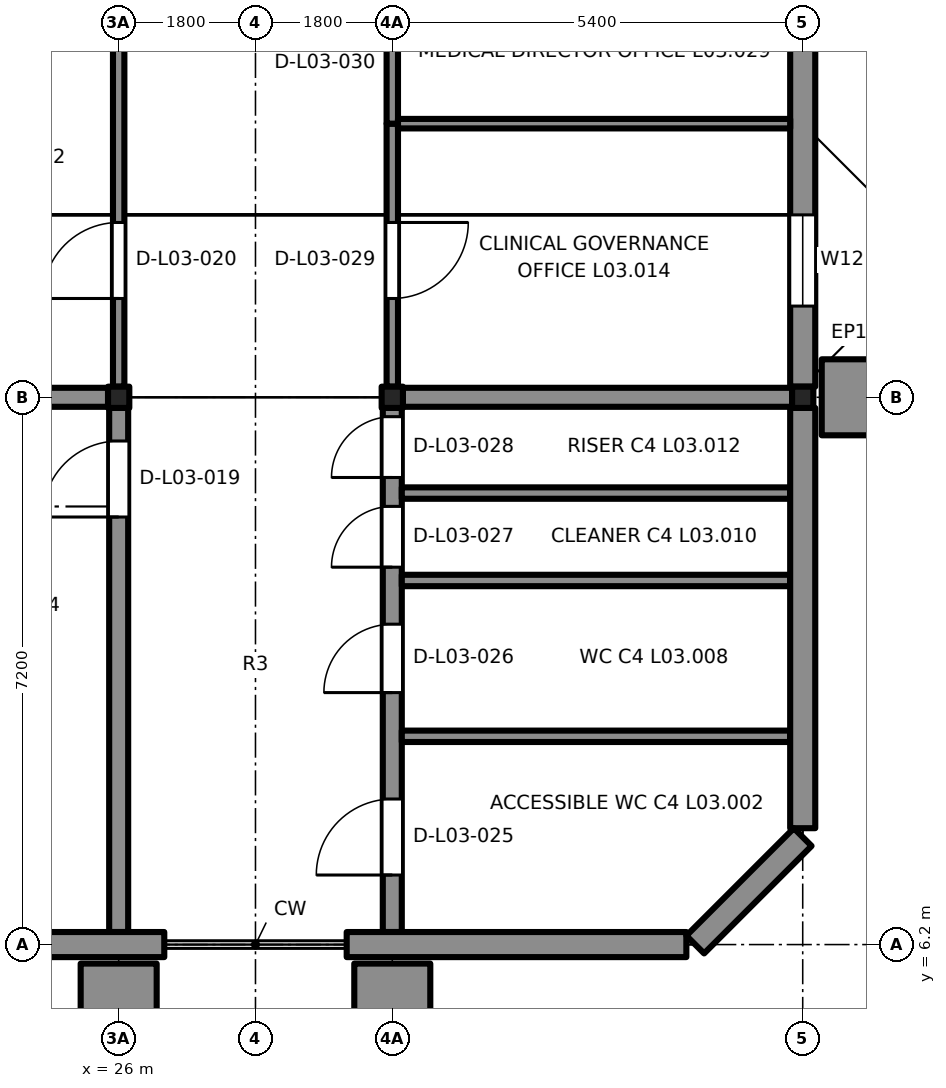
"""IFC4 building model, lengths in metres.
Left out: names, types, materials, properties, quantities, classifications, styles, units other than length and angle.
Written with IfcOpenShell. Run it as: python <this file> out.ifc"""

import sys

from ifc_helpers import new_model, si_unit, direction, frame, frame_2d, origin, origin_2d, place, context, subcontext, project, spatial, rectangle, extrude, element, fill, save


model = new_model("IFC4")
c1 = context("Model", 3, precision=1e-05, world=origin(), true_north=direction((0.0, 1.0)))
c2 = subcontext(c1, "Body", "Model", "MODEL_VIEW")
j1 = project(units=[si_unit("LENGTHUNIT", "METRE"), si_unit("PLANEANGLEUNIT", "RADIAN")], contexts=[c1])
p1 = place(None, origin())
s1 = spatial("IfcSite", under=j1, at=p1, CompositionType="ELEMENT")
p2 = place(p1, origin())
s2 = spatial("IfcBuilding", under=s1, at=p2, CompositionType="ELEMENT")
p3 = place(p2, frame((0.0, 0.0, 14.1)))
s3 = spatial("IfcBuildingStorey", under=s2, at=p3, CompositionType="ELEMENT", Elevation=14.1)
for number, where, z_axis, x_axis in (
    (1, (26.0, 13.4, 0.0), (0.0, 0.0, 1.0), (1.0, 0.0, 0.0)),
    (2, (29.6, 13.4, 0.0), (0.0, 0.0, 1.0), (1.0, 0.0, 0.0)),
    (3, (35.0, 13.4, 0.0), (0.0, 0.0, 1.0), (1.0, 0.0, 0.0)),
):
    element("IfcColumn", number, at=place(p3, frame(where, z_axis=z_axis, x_axis=x_axis)), inside=s3, PredefinedType="COLUMN", context=c2, shape_type="SweptSolid", body=[
        extrude(rectangle(XDim=0.28, YDim=0.28, at=origin_2d()), origin(), (0.0, 0.0, 1.0), 3.9),
    ])
p4 = place(p3, frame((26.0, 6.365, 0.0), z_axis=(0.0, 0.0, 1.0), x_axis=(0.0, 1.0, 0.0)))
e4 = element("IfcWall", 4, at=p4, inside=s3, PredefinedType="SHEAR", context=c2, shape_type="SweptSolid", body=[
    extrude(rectangle(XDim=6.895, YDim=0.25, at=frame_2d((3.448, 0.0))), origin(), (0.0, 0.0, 1.0), 3.2),
])
p5 = place(p4, frame((5.46, 0.0, 0.0)))
e5 = element("IfcOpeningElement", 5, at=p5, cuts=e4, PredefinedType="OPENING", context=c2, shape_type="SweptSolid", body=[
    extrude(rectangle(XDim=1.0, YDim=2.1, at=frame_2d((0.5, 1.05))), frame((0.0, 0.135, 0.0), z_axis=(0.0, -1.0, 0.0), x_axis=(1.0, 0.0, 0.0)), (0.0, 0.0, 1.0), 0.27),
])
p6 = place(p3, frame((20.74, 13.4, 0.0), z_axis=(0.0, 0.0, 1.0), x_axis=(1.0, 0.0, 0.0)))
e6 = element("IfcWall", 6, at=p6, inside=s3, PredefinedType="SHEAR", context=c2, shape_type="SweptSolid", body=[
    extrude(rectangle(XDim=5.12, YDim=0.25, at=frame_2d((2.56, 0.0))), origin(), (0.0, 0.0, 1.0), 3.2),
])
p7 = place(p3, frame((29.6, 6.365, 0.0), z_axis=(0.0, 0.0, 1.0), x_axis=(0.0, 1.0, 0.0)))
e7 = element("IfcWall", 7, at=p7, inside=s3, PredefinedType="SHEAR", context=c2, shape_type="SweptSolid", body=[
    extrude(rectangle(XDim=6.895, YDim=0.25, at=frame_2d((3.448, 0.0))), origin(), (0.0, 0.0, 1.0), 3.2),
])
p8 = place(p7, frame((0.75, 0.0, 0.0)))
e8 = element("IfcOpeningElement", 8, at=p8, cuts=e7, PredefinedType="OPENING", context=c2, shape_type="SweptSolid", body=[
    extrude(rectangle(XDim=1.0, YDim=2.1, at=frame_2d((0.5, 1.05))), frame((0.0, 0.135, 0.0), z_axis=(0.0, -1.0, 0.0), x_axis=(1.0, 0.0, 0.0)), (0.0, 0.0, 1.0), 0.27),
])
p9 = place(p7, frame((3.15, 0.0, 0.0)))
e9 = element("IfcOpeningElement", 9, at=p9, cuts=e7, PredefinedType="OPENING", context=c2, shape_type="SweptSolid", body=[
    extrude(rectangle(XDim=0.9, YDim=2.1, at=frame_2d((0.45, 1.05))), frame((0.0, 0.135, 0.0), z_axis=(0.0, -1.0, 0.0), x_axis=(1.0, 0.0, 0.0)), (0.0, 0.0, 1.0), 0.27),
])
p10 = place(p7, frame((4.8, 0.0, 0.0)))
e10 = element("IfcOpeningElement", 10, at=p10, cuts=e7, PredefinedType="OPENING", context=c2, shape_type="SweptSolid", body=[
    extrude(rectangle(XDim=0.8, YDim=2.1, at=frame_2d((0.4, 1.05))), frame((0.0, 0.135, 0.0), z_axis=(0.0, -1.0, 0.0), x_axis=(1.0, 0.0, 0.0)), (0.0, 0.0, 1.0), 0.27),
])
p11 = place(p7, frame((5.98, 0.0, 0.0)))
e11 = element("IfcOpeningElement", 11, at=p11, cuts=e7, PredefinedType="OPENING", context=c2, shape_type="SweptSolid", body=[
    extrude(rectangle(XDim=0.8, YDim=2.1, at=frame_2d((0.4, 1.05))), frame((0.0, 0.135, 0.0), z_axis=(0.0, -1.0, 0.0), x_axis=(1.0, 0.0, 0.0)), (0.0, 0.0, 1.0), 0.27),
])
p12 = place(p3, frame((29.74, 13.4, 0.0), z_axis=(0.0, 0.0, 1.0), x_axis=(1.0, 0.0, 0.0)))
e12 = element("IfcWall", 12, at=p12, inside=s3, PredefinedType="SHEAR", context=c2, shape_type="SweptSolid", body=[
    extrude(rectangle(XDim=5.12, YDim=0.25, at=frame_2d((2.56, 0.0))), origin(), (0.0, 0.0, 1.0), 3.2),
])
for number, where, z_axis, x_axis in (
    (13, (29.725, 8.94, 0.0), (0.0, 0.0, 1.0), (1.0, 0.0, 0.0)),
    (14, (29.725, 10.99, 0.0), (0.0, 0.0, 1.0), (1.0, 0.0, 0.0)),
    (15, (29.725, 12.14, 0.0), (0.0, 0.0, 1.0), (1.0, 0.0, 0.0)),
):
    element("IfcWall", number, at=place(p3, frame(where, z_axis=z_axis, x_axis=x_axis)), inside=s3, PredefinedType="PARTITIONING", context=c2, shape_type="SweptSolid", body=[
        extrude(rectangle(XDim=5.11, YDim=0.15, at=frame_2d((2.555, 0.0))), origin(), (0.0, 0.0, 1.0), 3.2),
    ])
p13 = place(p3, frame((35.0, 13.26, 0.0), z_axis=(0.0, 0.0, 1.0), x_axis=(0.0, -1.0, 0.0)))
e16 = element("IfcWall", 16, at=p13, inside=s3, PredefinedType="SOLIDWALL", context=c2, shape_type="SweptSolid", body=[
    extrude(rectangle(XDim=5.529, YDim=0.33, at=frame_2d((2.765, 0.0))), origin(), (0.0, 0.0, 1.0), 3.2),
])
p14 = place(p3, frame((35.0, 20.46, 0.0), z_axis=(0.0, 0.0, 1.0), x_axis=(0.0, -1.0, 0.0)))
e17 = element("IfcWall", 17, at=p14, inside=s3, PredefinedType="SOLIDWALL", context=c2, shape_type="SweptSolid", body=[
    extrude(rectangle(XDim=6.92, YDim=0.33, at=frame_2d((3.46, 0.0))), origin(), (0.0, 0.0, 1.0), 3.2),
])
p15 = place(p14, frame((4.66, 0.0, 0.9)))
e18 = element("IfcOpeningElement", 18, at=p15, cuts=e17, PredefinedType="OPENING", context=c2, shape_type="SweptSolid", body=[
    extrude(rectangle(XDim=1.2, YDim=1.5, at=frame_2d((0.6, 0.75))), frame((0.0, 0.175, 0.0), z_axis=(0.0, -1.0, 0.0), x_axis=(1.0, 0.0, 0.0)), (0.0, 0.0, 1.0), 0.35),
])
p16 = place(p14, frame((1.06, 0.0, 0.9)))
e19 = element("IfcOpeningElement", 19, at=p16, cuts=e17, PredefinedType="OPENING", context=c2, shape_type="SweptSolid", body=[
    extrude(rectangle(XDim=1.2, YDim=1.5, at=frame_2d((0.6, 0.75))), frame((0.0, 0.175, 0.0), z_axis=(0.0, -1.0, 0.0), x_axis=(1.0, 0.0, 0.0)), (0.0, 0.0, 1.0), 0.35),
])
p17 = place(p3, frame((35.625, 13.9, 0.0), z_axis=(0.0, 0.0, 1.0), x_axis=(0.0, -1.0, 0.0)))
e20 = element("IfcWall", 20, at=p17, inside=s3, PredefinedType="SOLIDWALL", context=c2, shape_type="SweptSolid", body=[
    extrude(rectangle(XDim=1.0, YDim=0.75, at=frame_2d((0.5, 0.0))), origin(), (0.0, 0.0, 1.0), 3.9),
])
p18 = place(p3, frame((26.6, 6.2, 0.0), z_axis=(0.0, 0.0, 1.0), x_axis=(-1.0, 0.0, 0.0)))
e21 = element("IfcWall", 21, at=p18, inside=s3, PredefinedType="SOLIDWALL", context=c2, shape_type="SweptSolid", body=[
    extrude(rectangle(XDim=2.68, YDim=0.33, at=frame_2d((1.34, 0.0))), origin(), (0.0, 0.0, 1.0), 3.2),
])
p19 = place(p3, frame((33.469, 6.2, 0.0), z_axis=(0.0, 0.0, 1.0), x_axis=(-1.0, 0.0, 0.0)))
e22 = element("IfcWall", 22, at=p19, inside=s3, PredefinedType="SOLIDWALL", context=c2, shape_type="SweptSolid", body=[
    extrude(rectangle(XDim=4.469, YDim=0.33, at=frame_2d((2.234, 0.0))), origin(), (0.0, 0.0, 1.0), 3.2),
])
for number, where, z_axis, x_axis in (
    (23, (26.5, 5.575, 0.0), (0.0, 0.0, 1.0), (-1.0, 0.0, 0.0)),
    (24, (30.1, 5.575, 0.0), (0.0, 0.0, 1.0), (-1.0, 0.0, 0.0)),
):
    element("IfcWall", number, at=place(p3, frame(where, z_axis=z_axis, x_axis=x_axis)), inside=s3, PredefinedType="SOLIDWALL", context=c2, shape_type="SweptSolid", body=[
        extrude(rectangle(XDim=1.0, YDim=0.75, at=frame_2d((0.5, 0.0))), origin(), (0.0, 0.0, 1.0), 3.9),
    ])
p20 = place(p3, frame((35.0, 7.614, 0.0), z_axis=(0.0, 0.0, 1.0), x_axis=(-0.707106781187, -0.707106781187, 0.0)))
e25 = element("IfcWall", 25, at=p20, inside=s3, PredefinedType="SOLIDWALL", context=c2, shape_type="SweptSolid", body=[
    extrude(rectangle(XDim=2.0, YDim=0.33, at=frame_2d((1.0, 0.0))), origin(), (0.0, 0.0, 1.0), 3.2),
])
p21 = place(p3, frame((34.95, 9.2, 3.6), z_axis=(0.0, 0.0, 1.0), x_axis=(0.0, -1.0, 0.0)))
e26 = element("IfcWall", 26, at=p21, inside=s3, PredefinedType="SOLIDWALL", context=c2, shape_type="SweptSolid", body=[
    extrude(rectangle(XDim=1.586, YDim=0.23, at=frame_2d((0.793, 0.0))), origin(), (0.0, 0.0, 1.0), 2.7),
])
p22 = place(p3, frame((34.95, 10.4, 3.6), z_axis=(0.0, 0.0, 1.0), x_axis=(0.0, -1.0, 0.0)))
e27 = element("IfcWall", 27, at=p22, inside=s3, PredefinedType="SOLIDWALL", context=c2, shape_type="SweptSolid", body=[
    extrude(rectangle(XDim=1.2, YDim=0.23, at=frame_2d((0.6, 0.0))), origin(), (0.0, 0.0, 1.0), 3.7),
])
p23 = place(p3, frame((34.95, 11.9, 3.6), z_axis=(0.0, 0.0, 1.0), x_axis=(0.0, -1.0, 0.0)))
e28 = element("IfcWall", 28, at=p23, inside=s3, PredefinedType="SOLIDWALL", context=c2, shape_type="SweptSolid", body=[
    extrude(rectangle(XDim=1.5, YDim=0.23, at=frame_2d((0.75, 0.0))), origin(), (0.0, 0.0, 1.0), 2.7),
])
p24 = place(p3, frame((34.95, 13.4, 3.6), z_axis=(0.0, 0.0, 1.0), x_axis=(0.0, -1.0, 0.0)))
e29 = element("IfcWall", 29, at=p24, inside=s3, PredefinedType="SOLIDWALL", context=c2, shape_type="SweptSolid", body=[
    extrude(rectangle(XDim=1.5, YDim=0.23, at=frame_2d((0.75, 0.0))), origin(), (0.0, 0.0, 1.0), 1.7),
])
p25 = place(p3, frame((26.3, 6.25, 3.9), z_axis=(0.0, 0.0, 1.0), x_axis=(-1.0, 0.0, 0.0)))
e30 = element("IfcWall", 30, at=p25, inside=s3, PredefinedType="SOLIDWALL", context=c2, shape_type="SweptSolid", body=[
    extrude(rectangle(XDim=1.5, YDim=0.23, at=frame_2d((0.75, 0.0))), origin(), (0.0, 0.0, 1.0), 2.4),
])
for number, where, z_axis, x_axis in (
    (31, (27.8, 6.25, 3.9), (0.0, 0.0, 1.0), (-1.0, 0.0, 0.0)),
    (32, (29.3, 6.25, 3.9), (0.0, 0.0, 1.0), (-1.0, 0.0, 0.0)),
):
    element("IfcWall", number, at=place(p3, frame(where, z_axis=z_axis, x_axis=x_axis)), inside=s3, PredefinedType="SOLIDWALL", context=c2, shape_type="SweptSolid", body=[
        extrude(rectangle(XDim=1.5, YDim=0.23, at=frame_2d((0.75, 0.0))), origin(), (0.0, 0.0, 1.0), 1.4),
    ])
p26 = place(p3, frame((30.8, 6.25, 3.9), z_axis=(0.0, 0.0, 1.0), x_axis=(-1.0, 0.0, 0.0)))
e33 = element("IfcWall", 33, at=p26, inside=s3, PredefinedType="SOLIDWALL", context=c2, shape_type="SweptSolid", body=[
    extrude(rectangle(XDim=1.5, YDim=0.23, at=frame_2d((0.75, 0.0))), origin(), (0.0, 0.0, 1.0), 2.4),
])
p27 = place(p3, frame((32.0, 6.25, 3.9), z_axis=(0.0, 0.0, 1.0), x_axis=(-1.0, 0.0, 0.0)))
e34 = element("IfcWall", 34, at=p27, inside=s3, PredefinedType="SOLIDWALL", context=c2, shape_type="SweptSolid", body=[
    extrude(rectangle(XDim=1.2, YDim=0.23, at=frame_2d((0.6, 0.0))), origin(), (0.0, 0.0, 1.0), 3.4),
])
p28 = place(p3, frame((33.5, 6.25, 3.9), z_axis=(0.0, 0.0, 1.0), x_axis=(-1.0, 0.0, 0.0)))
e35 = element("IfcWall", 35, at=p28, inside=s3, PredefinedType="SOLIDWALL", context=c2, shape_type="SweptSolid", body=[
    extrude(rectangle(XDim=1.5, YDim=0.23, at=frame_2d((0.75, 0.0))), origin(), (0.0, 0.0, 1.0), 2.4),
])
p29 = place(p3, frame((35.0, 7.614, 3.6), z_axis=(0.0, 0.0, 1.0), x_axis=(-0.707106781187, -0.707106781187, 0.0)))
e36 = element("IfcWall", 36, at=p29, inside=s3, PredefinedType="SOLIDWALL", context=c2, shape_type="SweptSolid", body=[
    extrude(rectangle(XDim=0.6, YDim=0.23, at=frame_2d((0.3, 0.0))), origin(), (0.0, 0.0, 1.0), 1.7),
])
p30 = place(p3, frame((34.576, 7.19, 3.6), z_axis=(0.0, 0.0, 1.0), x_axis=(-0.707106781187, -0.707106781187, 0.0)))
e37 = element("IfcWall", 37, at=p30, inside=s3, PredefinedType="SOLIDWALL", context=c2, shape_type="SweptSolid", body=[
    extrude(rectangle(XDim=0.8, YDim=0.23, at=frame_2d((0.4, 0.0))), origin(), (0.0, 0.0, 1.0), 2.7),
])
p31 = place(p3, frame((34.01, 6.624, 3.9), z_axis=(0.0, 0.0, 1.0), x_axis=(-0.707106781187, -0.707106781187, 0.0)))
e38 = element("IfcWall", 38, at=p31, inside=s3, PredefinedType="SOLIDWALL", context=c2, shape_type="SweptSolid", body=[
    extrude(rectangle(XDim=0.6, YDim=0.23, at=frame_2d((0.3, 0.0))), origin(), (0.0, 0.0, 1.0), 1.4),
])
p32 = place(p3, frame((35.0, 14.9, 3.2), z_axis=(0.0, 0.0, 1.0), x_axis=(0.0, -1.0, 0.0)))
e39 = element("IfcWall", 39, at=p32, inside=s3, PredefinedType="SOLIDWALL", context=c2, shape_type="SweptSolid", body=[
    extrude(rectangle(XDim=1.36, YDim=0.23, at=frame_2d((0.68, 0.0))), origin(), (0.0, 0.0, 1.0), 2.1),
])
p33 = place(p3, frame((35.0, 16.4, 3.2), z_axis=(0.0, 0.0, 1.0), x_axis=(0.0, -1.0, 0.0)))
e40 = element("IfcWall", 40, at=p33, inside=s3, PredefinedType="SOLIDWALL", context=c2, shape_type="SweptSolid", body=[
    extrude(rectangle(XDim=1.5, YDim=0.23, at=frame_2d((0.75, 0.0))), origin(), (0.0, 0.0, 1.0), 3.1),
])
p34 = place(p3, frame((35.0, 17.6, 3.2), z_axis=(0.0, 0.0, 1.0), x_axis=(0.0, -1.0, 0.0)))
e41 = element("IfcWall", 41, at=p34, inside=s3, PredefinedType="SOLIDWALL", context=c2, shape_type="SweptSolid", body=[
    extrude(rectangle(XDim=1.2, YDim=0.23, at=frame_2d((0.6, 0.0))), origin(), (0.0, 0.0, 1.0), 4.1),
])
p35 = place(p3, frame((35.0, 19.1, 3.2), z_axis=(0.0, 0.0, 1.0), x_axis=(0.0, -1.0, 0.0)))
e42 = element("IfcWall", 42, at=p35, inside=s3, PredefinedType="SOLIDWALL", context=c2, shape_type="SweptSolid", body=[
    extrude(rectangle(XDim=1.5, YDim=0.23, at=frame_2d((0.75, 0.0))), origin(), (0.0, 0.0, 1.0), 3.1),
])
p36 = place(p3, frame((26.0, 13.54, 0.0), z_axis=(0.0, 0.0, 1.0), x_axis=(0.0, 1.0, 0.0)))
e43 = element("IfcWall", 43, at=p36, inside=s3, PredefinedType="PARTITIONING", context=c2, shape_type="SweptSolid", body=[
    extrude(rectangle(XDim=6.92, YDim=0.15, at=frame_2d((3.46, 0.0))), origin(), (0.0, 0.0, 1.0), 5.233),
])
p37 = place(p36, frame((1.16, 0.0, 0.0)))
e44 = element("IfcOpeningElement", 44, at=p37, cuts=e43, PredefinedType="OPENING", context=c2, shape_type="SweptSolid", body=[
    extrude(rectangle(XDim=1.0, YDim=2.1, at=frame_2d((0.5, 1.05))), frame((0.0, 0.085, 0.0), z_axis=(0.0, -1.0, 0.0), x_axis=(1.0, 0.0, 0.0)), (0.0, 0.0, 1.0), 0.17),
])
p38 = place(p3, frame((29.6, 17.0, 0.0), z_axis=(0.0, 0.0, 1.0), x_axis=(0.0, -1.0, 0.0)))
e45 = element("IfcWall", 45, at=p38, inside=s3, PredefinedType="PARTITIONING", context=c2, shape_type="SweptSolid", body=[
    extrude(rectangle(XDim=3.46, YDim=0.15, at=frame_2d((1.73, 0.0))), origin(), (0.0, 0.0, 1.0), 5.233),
])
p39 = place(p38, frame((1.3, 0.0, 0.0)))
e46 = element("IfcOpeningElement", 46, at=p39, cuts=e45, PredefinedType="OPENING", context=c2, shape_type="SweptSolid", body=[
    extrude(rectangle(XDim=1.0, YDim=2.1, at=frame_2d((0.5, 1.05))), frame((0.0, 0.085, 0.0), z_axis=(0.0, -1.0, 0.0), x_axis=(1.0, 0.0, 0.0)), (0.0, 0.0, 1.0), 0.17),
])
p40 = place(p3, frame((29.6, 20.46, 0.0), z_axis=(0.0, 0.0, 1.0), x_axis=(0.0, -1.0, 0.0)))
e47 = element("IfcWall", 47, at=p40, inside=s3, PredefinedType="PARTITIONING", context=c2, shape_type="SweptSolid", body=[
    extrude(rectangle(XDim=3.46, YDim=0.15, at=frame_2d((1.73, 0.0))), origin(), (0.0, 0.0, 1.0), 5.233),
])
p41 = place(p40, frame((1.16, 0.0, 0.0)))
e48 = element("IfcOpeningElement", 48, at=p41, cuts=e47, PredefinedType="OPENING", context=c2, shape_type="SweptSolid", body=[
    extrude(rectangle(XDim=1.0, YDim=2.1, at=frame_2d((0.5, 1.05))), frame((0.0, 0.085, 0.0), z_axis=(0.0, -1.0, 0.0), x_axis=(1.0, 0.0, 0.0)), (0.0, 0.0, 1.0), 0.17),
])
p42 = place(p3, frame((34.835, 17.0, 0.0), z_axis=(0.0, 0.0, 1.0), x_axis=(-1.0, 0.0, 0.0)))
e49 = element("IfcWall", 49, at=p42, inside=s3, PredefinedType="PARTITIONING", context=c2, shape_type="SweptSolid", body=[
    extrude(rectangle(XDim=5.16, YDim=0.125, at=frame_2d((2.58, 0.0))), origin(), (0.0, 0.0, 1.0), 5.233),
])
p43 = place(p5, origin())
e50 = element("IfcDoor", 50, at=p43, inside=s3, OperationType="SINGLE_SWING_RIGHT", PredefinedType="DOOR", context=c2, shape_type="SweptSolid", body=[
    extrude(rectangle(XDim=1.0, YDim=2.1, at=frame_2d((0.5, 1.05))), frame((0.0, 0.025, 0.0), z_axis=(0.0, -1.0, 0.0), x_axis=(1.0, 0.0, 0.0)), (0.0, 0.0, 1.0), 0.05),
])
fill(e5, e50)
p44 = place(p8, origin())
e51 = element("IfcDoor", 51, at=p44, inside=s3, OperationType="SINGLE_SWING_LEFT", PredefinedType="DOOR", context=c2, shape_type="SweptSolid", body=[
    extrude(rectangle(XDim=1.0, YDim=2.1, at=frame_2d((0.5, 1.05))), frame((0.0, 0.025, 0.0), z_axis=(0.0, -1.0, 0.0), x_axis=(1.0, 0.0, 0.0)), (0.0, 0.0, 1.0), 0.05),
])
fill(e8, e51)
p45 = place(p9, origin())
e52 = element("IfcDoor", 52, at=p45, inside=s3, OperationType="SINGLE_SWING_LEFT", PredefinedType="DOOR", context=c2, shape_type="SweptSolid", body=[
    extrude(rectangle(XDim=0.9, YDim=2.1, at=frame_2d((0.45, 1.05))), frame((0.0, 0.025, 0.0), z_axis=(0.0, -1.0, 0.0), x_axis=(1.0, 0.0, 0.0)), (0.0, 0.0, 1.0), 0.05),
])
fill(e9, e52)
p46 = place(p10, origin())
e53 = element("IfcDoor", 53, at=p46, inside=s3, OperationType="SINGLE_SWING_LEFT", PredefinedType="DOOR", context=c2, shape_type="SweptSolid", body=[
    extrude(rectangle(XDim=0.8, YDim=2.1, at=frame_2d((0.4, 1.05))), frame((0.0, 0.025, 0.0), z_axis=(0.0, -1.0, 0.0), x_axis=(1.0, 0.0, 0.0)), (0.0, 0.0, 1.0), 0.05),
])
fill(e10, e53)
p47 = place(p11, origin())
e54 = element("IfcDoor", 54, at=p47, inside=s3, OperationType="SINGLE_SWING_LEFT", PredefinedType="DOOR", context=c2, shape_type="SweptSolid", body=[
    extrude(rectangle(XDim=0.8, YDim=2.1, at=frame_2d((0.4, 1.05))), frame((0.0, 0.025, 0.0), z_axis=(0.0, -1.0, 0.0), x_axis=(1.0, 0.0, 0.0)), (0.0, 0.0, 1.0), 0.05),
])
fill(e11, e54)
p48 = place(p15, origin())
e55 = element("IfcWindow", 55, at=p48, inside=s3, PartitioningType="SINGLE_PANEL", PredefinedType="WINDOW", context=c2, shape_type="SweptSolid", body=[
    extrude(rectangle(XDim=1.2, YDim=1.5, at=frame_2d((0.6, 0.75))), frame((0.0, -0.03, 0.0), z_axis=(0.0, -1.0, 0.0), x_axis=(1.0, 0.0, 0.0)), (0.0, 0.0, 1.0), 0.06),
])
fill(e18, e55)
p49 = place(p37, origin())
e56 = element("IfcDoor", 56, at=p49, inside=s3, OperationType="SINGLE_SWING_LEFT", PredefinedType="DOOR", context=c2, shape_type="SweptSolid", body=[
    extrude(rectangle(XDim=1.0, YDim=2.1, at=frame_2d((0.5, 1.05))), frame((0.0, 0.025, 0.0), z_axis=(0.0, -1.0, 0.0), x_axis=(1.0, 0.0, 0.0)), (0.0, 0.0, 1.0), 0.05),
])
fill(e44, e56)
p50 = place(p39, origin())
e57 = element("IfcDoor", 57, at=p50, inside=s3, OperationType="SINGLE_SWING_RIGHT", PredefinedType="DOOR", context=c2, shape_type="SweptSolid", body=[
    extrude(rectangle(XDim=1.0, YDim=2.1, at=frame_2d((0.5, 1.05))), frame((0.0, 0.025, 0.0), z_axis=(0.0, -1.0, 0.0), x_axis=(1.0, 0.0, 0.0)), (0.0, 0.0, 1.0), 0.05),
])
fill(e46, e57)
save(model, sys.argv[1])
